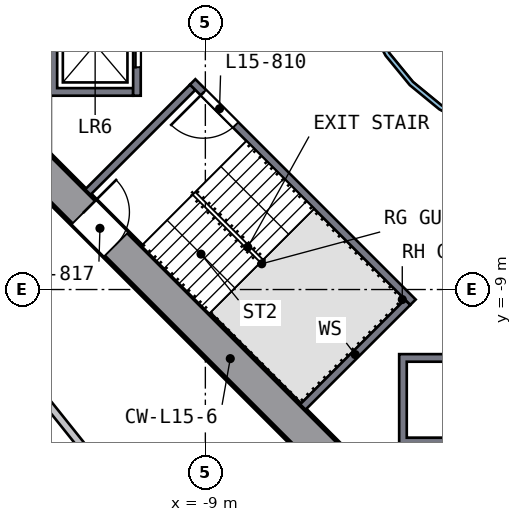
"""IFC4 building model, lengths in metres.
Left out: names, types, materials, properties, quantities, classifications, styles, units other than length and angle.
Written with IfcOpenShell. Run it as: python <this file> out.ifc"""

import sys

from ifc_helpers import new_model, si_unit, direction, frame, frame_2d, origin, place, context, subcontext, project, spatial, polyline, rectangle, outline, extrude, element, fill, save


model = new_model("IFC4")
c1 = context("Model", 3, precision=1e-05, world=origin(), true_north=direction((0.0, 1.0)))
c2 = subcontext(c1, "Body", "Model", "MODEL_VIEW")
j1 = project(units=[si_unit("LENGTHUNIT", "METRE"), si_unit("PLANEANGLEUNIT", "RADIAN")], contexts=[c1])
p1 = place(None, origin())
s1 = spatial("IfcSite", under=j1, at=p1, CompositionType="ELEMENT")
p2 = place(p1, origin())
s2 = spatial("IfcBuilding", under=s1, at=p2, CompositionType="ELEMENT")
p3 = place(p2, frame((0.0, 0.0, 68.0)))
s3 = spatial("IfcBuildingStorey", under=s2, at=p3, CompositionType="ELEMENT", Elevation=68.0)
p4 = place(p3, frame((-13.682, -5.481, 0.0), z_axis=(0.0, 0.0, 1.0), x_axis=(0.707106781, -0.707106781, 0.0)))
e1 = element("IfcWall", 1, at=p4, inside=s3, PredefinedType="SHEAR", context=c2, shape_type="SweptSolid", body=[
    extrude(rectangle(XDim=11.598, YDim=0.9, at=frame_2d((5.799, 0.0))), origin(), (0.0, 0.0, 1.0), 3.5),
])
p5 = place(p4, frame((2.099, 0.0, 0.0)))
e2 = element("IfcOpeningElement", 2, at=p5, cuts=e1, PredefinedType="OPENING", context=c2, shape_type="SweptSolid", body=[
    extrude(rectangle(XDim=1.2, YDim=2.1, at=frame_2d((0.6, 1.05))), frame((0.0, 0.46, 0.0), z_axis=(0.0, -1.0, 0.0), x_axis=(1.0, 0.0, 0.0)), (0.0, 0.0, 1.0), 0.92),
])
p6 = place(p3, origin())
e3 = element("IfcWall", 3, at=p6, inside=s3, PredefinedType="SOLIDWALL", context=c2, shape_type="SweptSolid", body=[
    extrude(outline(polyline([(-13.1, -3.9), (-13.1, -1.2), (-10.9, -1.2), (-10.9, -1.4), (-12.9, -1.4), (-12.9, -3.7), (-10.9, -3.7), (-10.9, -3.9), (-13.1, -3.9)])), origin(), (0.0, 0.0, 1.0), 3.19),
])
p7 = place(p3, frame((-10.8, -1.2, 0.0), z_axis=(0.0, 0.0, 1.0), x_axis=(0.0, -1.0, 0.0)))
e4 = element("IfcWall", 4, at=p7, inside=s3, PredefinedType="SOLIDWALL", context=c2, shape_type="SweptSolid", body=[
    extrude(rectangle(XDim=2.7, YDim=0.2, at=frame_2d((1.35, 0.0))), origin(), (0.0, 0.0, 1.0), 3.19),
])
p8 = place(p7, frame((0.75, 0.0, 0.0)))
e5 = element("IfcOpeningElement", 5, at=p8, cuts=e4, PredefinedType="OPENING", context=c2, shape_type="SweptSolid", body=[
    extrude(rectangle(XDim=1.2, YDim=2.1, at=frame_2d((0.6, 1.05))), frame((0.0, 0.11, 0.0), z_axis=(0.0, -1.0, 0.0), x_axis=(1.0, 0.0, 0.0)), (0.0, 0.0, 1.0), 0.22),
])
p9 = place(p3, origin())
e6 = element("IfcWall", 6, at=p9, inside=s3, PredefinedType="SOLIDWALL", context=c2, shape_type="SweptSolid", body=[
    extrude(outline(polyline([(-1.2, -13.1), (-3.9, -13.1), (-3.9, -10.7), (-1.2, -10.7), (-1.2, -13.1)]), holes=[polyline([(-3.7, -10.9), (-3.7, -12.9), (-1.4, -12.9), (-1.4, -10.9), (-3.7, -10.9)])]), origin(), (0.0, 0.0, 1.0), 3.19),
])
p10 = place(p3, frame((-3.535, -9.334, 0.0), z_axis=(0.0, 0.0, 1.0), x_axis=(-0.707106781, 0.707106781, 0.0)))
e7 = element("IfcWall", 7, at=p10, inside=s3, PredefinedType="SOLIDWALL", context=c2, shape_type="SweptSolid", body=[
    extrude(rectangle(XDim=8.2, YDim=0.2, at=frame_2d((4.1, 0.0))), origin(), (0.0, 0.0, 1.0), 3.19),
])
p11 = place(p10, frame((6.6, 0.0, 0.0)))
e8 = element("IfcOpeningElement", 8, at=p11, cuts=e7, PredefinedType="OPENING", context=c2, shape_type="SweptSolid", body=[
    extrude(rectangle(XDim=1.2, YDim=2.1, at=frame_2d((0.6, 1.05))), frame((0.0, 0.11, 0.0), z_axis=(0.0, -1.0, 0.0), x_axis=(1.0, 0.0, 0.0)), (0.0, 0.0, 1.0), 0.22),
])
for number, where, z_axis, x_axis in (
    (9, (-9.334, -3.677, 0.0), (0.0, 0.0, 1.0), (-0.707, -0.707, 0.0)),
    (10, (-3.677, -9.334, 0.0), (0.0, 0.0, 1.0), (-0.707, -0.707, 0.0)),
):
    element("IfcWall", number, at=place(p3, frame(where, z_axis=z_axis, x_axis=x_axis)), inside=s3, PredefinedType="SOLIDWALL", context=c2, shape_type="SweptSolid", body=[
        extrude(rectangle(XDim=3.9, YDim=0.2, at=frame_2d((1.95, 0.0))), origin(), (0.0, 0.0, 1.0), 3.19),
    ])
p12 = place(p3, origin())
e11 = element("IfcWall", 11, at=p12, inside=s3, PredefinedType="SOLIDWALL", context=c2, shape_type="SweptSolid", body=[
    extrude(outline(polyline([(5.021, -0.999), (4.73, -1.959), (4.257, -2.844), (3.62, -3.62), (2.844, -4.257), (1.959, -4.73), (0.999, -5.021), (0.0, -5.12), (-0.999, -5.021), (-1.959, -4.73), (-2.844, -4.257), (-3.62, -3.62), (-4.257, -2.844), (-4.73, -1.959), (-5.021, -0.999), (-5.12, 0.0), (-5.021, 0.999), (-4.73, 1.959), (-4.257, 2.844), (-3.62, 3.62), (-2.844, 4.257), (-1.959, 4.73), (-0.999, 5.021), (0.0, 5.12), (0.999, 5.021), (1.959, 4.73), (2.844, 4.257), (3.62, 3.62), (4.257, 2.844), (4.73, 1.959), (5.021, 0.999), (5.12, 0.0), (5.021, -0.999)]), holes=[polyline([(4.904, 0.976), (4.619, 1.913), (4.157, 2.778), (3.535, 3.535), (2.778, 4.157), (1.913, 4.619), (0.976, 4.904), (0.0, 5.0), (-0.976, 4.904), (-1.913, 4.619), (-2.778, 4.157), (-3.535, 3.535), (-4.157, 2.778), (-4.619, 1.913), (-4.904, 0.976), (-5.0, 0.0), (-4.904, -0.976), (-4.619, -1.913), (-4.157, -2.778), (-3.535, -3.535), (-2.778, -4.157), (-1.913, -4.619), (-0.976, -4.904), (0.0, -5.0), (0.976, -4.904), (1.913, -4.619), (2.778, -4.157), (3.535, -3.535), (4.157, -2.778), (4.619, -1.913), (4.904, -0.976), (5.0, 0.0), (4.904, 0.976)])]), origin(), (0.0, 0.0, 1.0), 3.19),
])
p13 = place(p3, frame((-13.184, -11.948, 0.0), z_axis=(0.0, 0.0, 1.0), x_axis=(0.624449816, -0.781064932, 0.0)))
e12 = element("IfcWall", 12, at=p13, inside=s3, PredefinedType="SOLIDWALL", context=c2, shape_type="SweptSolid", body=[
    extrude(rectangle(XDim=3.4, YDim=0.2, at=frame_2d((1.7, 0.0))), origin(), (0.0, 0.0, 1.0), 3.19),
])
p14 = place(p8, origin())
e13 = element("IfcDoor", 13, at=p14, inside=s3, OperationType="DOUBLE_DOOR_SLIDING", PredefinedType="DOOR", context=c2, shape_type="SweptSolid", body=[
    extrude(rectangle(XDim=1.2, YDim=2.1, at=frame_2d((0.6, 1.05))), frame((0.0, 0.025, 0.0), z_axis=(0.0, -1.0, 0.0), x_axis=(1.0, 0.0, 0.0)), (0.0, 0.0, 1.0), 0.05),
])
fill(e5, e13)
p15 = place(p11, origin())
e14 = element("IfcDoor", 14, at=p15, inside=s3, OperationType="SINGLE_SWING_RIGHT", PredefinedType="DOOR", context=c2, shape_type="SweptSolid", body=[
    extrude(rectangle(XDim=1.2, YDim=2.1, at=frame_2d((0.6, 1.05))), frame((0.0, 0.025, 0.0), z_axis=(0.0, -1.0, 0.0), x_axis=(1.0, 0.0, 0.0)), (0.0, 0.0, 1.0), 0.05),
])
fill(e8, e14)
p16 = place(p5, origin())
e15 = element("IfcDoor", 15, at=p16, inside=s3, OperationType="SINGLE_SWING_LEFT", PredefinedType="DOOR", context=c2, shape_type="SweptSolid", body=[
    extrude(rectangle(XDim=1.2, YDim=2.1, at=frame_2d((0.6, 1.05))), frame((0.0, 0.025, 0.0), z_axis=(0.0, -1.0, 0.0), x_axis=(1.0, 0.0, 0.0)), (0.0, 0.0, 1.0), 0.05),
])
fill(e2, e15)
save(model, sys.argv[1])
